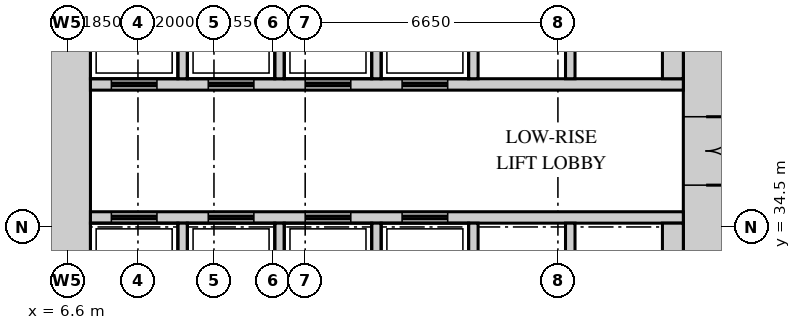
"""IFC4 building model, lengths in metres.
Left out: names, types, materials, properties, quantities, classifications, styles, units other than length and angle.
Written with IfcOpenShell. Run it as: python <this file> out.ifc"""

import sys

from ifc_helpers import new_model, si_unit, direction, frame, frame_2d, origin, place, context, subcontext, project, spatial, rectangle, extrude, source, transform, mapped, element, fill, save


model = new_model("IFC4")
c1 = context("Model", 3, precision=1e-05, world=origin(), true_north=direction((0.0, 1.0)))
c2 = subcontext(c1, "Body", "Model", "MODEL_VIEW")
j1 = project(units=[si_unit("LENGTHUNIT", "METRE"), si_unit("PLANEANGLEUNIT", "RADIAN")], contexts=[c1])
p1 = place(None, origin())
s1 = spatial("IfcSite", under=j1, at=p1, CompositionType="ELEMENT")
p2 = place(p1, origin())
s2 = spatial("IfcBuilding", under=s1, at=p2, CompositionType="ELEMENT")
p3 = place(p2, frame((0.0, 0.0, 7.5)))
s3 = spatial("IfcBuildingStorey", under=s2, at=p3, CompositionType="ELEMENT", Elevation=7.5)
m1 = source(origin(), c2, "Body", "SweptSolid", [
    extrude(rectangle(XDim=27.6, YDim=1.2, at=frame_2d((13.8, 0.0))), origin(), (0.0, 0.0, 1.0), 5.2),
])
p4 = place(p3, frame((23.4, 13.2, 0.0), z_axis=(0.0, 0.0, 1.0), x_axis=(0.0, 1.0, 0.0)))
e1 = element("IfcWall", 1, at=p4, inside=s3, PredefinedType="SHEAR", context=c2, shape_type="MappedRepresentation", body=[
    mapped(m1, transform((0.0, 0.0, 0.0))),
])
m2 = source(origin(), c2, "Body", "SweptSolid", [
    extrude(rectangle(XDim=1.8, YDim=2.1, at=frame_2d((0.9, 1.05))), frame((0.0, 0.61, 0.0), z_axis=(0.0, -1.0, 0.0), x_axis=(1.0, 0.0, 0.0)), (0.0, 0.0, 1.0), 1.22),
])
p5 = place(p4, frame((22.4, 0.0, 0.0)))
e2 = element("IfcOpeningElement", 2, at=p5, cuts=e1, PredefinedType="OPENING", context=c2, shape_type="MappedRepresentation", body=[
    mapped(m2, transform((0.0, 0.0, 0.0))),
])
m3 = source(origin(), c2, "Body", "SweptSolid", [
    extrude(rectangle(XDim=1.2, YDim=2.1, at=frame_2d((0.6, 1.05))), frame((0.0, 0.61, 0.0), z_axis=(0.0, -1.0, 0.0), x_axis=(1.0, 0.0, 0.0)), (0.0, 0.0, 1.0), 1.22),
])
p6 = place(p4, frame((15.15, 0.0, 0.0)))
e3 = element("IfcOpeningElement", 3, at=p6, cuts=e1, PredefinedType="OPENING", context=c2, shape_type="MappedRepresentation", body=[
    mapped(m3, transform((0.0, 0.0, 0.0))),
])
m4 = source(origin(), c2, "Body", "SweptSolid", [
    extrude(rectangle(XDim=0.9, YDim=2.1, at=frame_2d((0.45, 1.05))), frame((0.0, 0.61, 0.0), z_axis=(0.0, -1.0, 0.0), x_axis=(1.0, 0.0, 0.0)), (0.0, 0.0, 1.0), 1.22),
])
p7 = place(p4, frame((1.15, 0.0, 0.0)))
e4 = element("IfcOpeningElement", 4, at=p7, cuts=e1, PredefinedType="OPENING", context=c2, shape_type="MappedRepresentation", body=[
    mapped(m4, transform((0.0, 0.0, 0.0))),
])
p8 = place(p4, frame((4.35, 0.0, 0.0)))
e5 = element("IfcOpeningElement", 5, at=p8, cuts=e1, PredefinedType="OPENING", context=c2, shape_type="MappedRepresentation", body=[
    mapped(m4, transform((0.0, 0.0, 0.0))),
])
p9 = place(p4, frame((7.6, 0.0, 0.0)))
e6 = element("IfcOpeningElement", 6, at=p9, cuts=e1, PredefinedType="OPENING", context=c2, shape_type="MappedRepresentation", body=[
    mapped(m4, transform((0.0, 0.0, 0.0))),
])
p10 = place(p3, frame((6.6, 13.2, 0.0), z_axis=(0.0, 0.0, 1.0), x_axis=(0.0, 1.0, 0.0)))
e7 = element("IfcWall", 7, at=p10, inside=s3, PredefinedType="SHEAR", context=c2, shape_type="MappedRepresentation", body=[
    mapped(m1, transform((0.0, 0.0, 0.0))),
])
m5 = source(origin(), c2, "Body", "SweptSolid", [
    extrude(rectangle(XDim=15.6, YDim=0.3, at=frame_2d((7.8, 0.0))), origin(), (0.0, 0.0, 1.0), 5.2),
])
p11 = place(p3, frame((7.2, 38.25, 0.0), z_axis=(0.0, 0.0, 1.0), x_axis=(1.0, 0.0, 0.0)))
e8 = element("IfcWall", 8, at=p11, inside=s3, PredefinedType="STANDARD", context=c2, shape_type="MappedRepresentation", body=[
    mapped(m5, transform((0.0, 0.0, 0.0))),
])
m6 = source(origin(), c2, "Body", "SweptSolid", [
    extrude(rectangle(XDim=1.2, YDim=2.1, at=frame_2d((0.6, 1.05))), frame((0.0, 0.16, 0.0), z_axis=(0.0, -1.0, 0.0), x_axis=(1.0, 0.0, 0.0)), (0.0, 0.0, 1.0), 0.32),
])
p12 = place(p11, frame((0.55, 0.0, 0.0)))
e9 = element("IfcOpeningElement", 9, at=p12, cuts=e8, PredefinedType="OPENING", context=c2, shape_type="MappedRepresentation", body=[
    mapped(m6, transform((0.0, 0.0, 0.0))),
])
p13 = place(p11, frame((3.1, 0.0, 0.0)))
e10 = element("IfcOpeningElement", 10, at=p13, cuts=e8, PredefinedType="OPENING", context=c2, shape_type="MappedRepresentation", body=[
    mapped(m6, transform((0.0, 0.0, 0.0))),
])
p14 = place(p11, frame((5.65, 0.0, 0.0)))
e11 = element("IfcOpeningElement", 11, at=p14, cuts=e8, PredefinedType="OPENING", context=c2, shape_type="MappedRepresentation", body=[
    mapped(m6, transform((0.0, 0.0, 0.0))),
])
p15 = place(p11, frame((8.2, 0.0, 0.0)))
e12 = element("IfcOpeningElement", 12, at=p15, cuts=e8, PredefinedType="OPENING", context=c2, shape_type="MappedRepresentation", body=[
    mapped(m6, transform((0.0, 0.0, 0.0))),
])
p16 = place(p3, frame((7.2, 34.75, 0.0), z_axis=(0.0, 0.0, 1.0), x_axis=(1.0, 0.0, 0.0)))
e13 = element("IfcWall", 13, at=p16, inside=s3, PredefinedType="STANDARD", context=c2, shape_type="MappedRepresentation", body=[
    mapped(m5, transform((0.0, 0.0, 0.0))),
])
p17 = place(p16, frame((0.55, 0.0, 0.0)))
e14 = element("IfcOpeningElement", 14, at=p17, cuts=e13, PredefinedType="OPENING", context=c2, shape_type="MappedRepresentation", body=[
    mapped(m6, transform((0.0, 0.0, 0.0))),
])
p18 = place(p16, frame((3.1, 0.0, 0.0)))
e15 = element("IfcOpeningElement", 15, at=p18, cuts=e13, PredefinedType="OPENING", context=c2, shape_type="MappedRepresentation", body=[
    mapped(m6, transform((0.0, 0.0, 0.0))),
])
p19 = place(p16, frame((5.65, 0.0, 0.0)))
e16 = element("IfcOpeningElement", 16, at=p19, cuts=e13, PredefinedType="OPENING", context=c2, shape_type="MappedRepresentation", body=[
    mapped(m6, transform((0.0, 0.0, 0.0))),
])
p20 = place(p16, frame((8.2, 0.0, 0.0)))
e17 = element("IfcOpeningElement", 17, at=p20, cuts=e13, PredefinedType="OPENING", context=c2, shape_type="MappedRepresentation", body=[
    mapped(m6, transform((0.0, 0.0, 0.0))),
])
m7 = source(origin(), c2, "Body", "SweptSolid", [
    extrude(rectangle(XDim=2.4, YDim=0.25, at=frame_2d((1.2, 0.0))), origin(), (0.0, 0.0, 1.0), 5.2),
])
for number, where, z_axis, x_axis in (
    (18, (9.625, 38.4, 0.0), (0.0, 0.0, 1.0), (0.0, 1.0, 0.0)),
    (19, (12.175, 38.4, 0.0), (0.0, 0.0, 1.0), (0.0, 1.0, 0.0)),
    (20, (14.725, 38.4, 0.0), (0.0, 0.0, 1.0), (0.0, 1.0, 0.0)),
    (21, (17.275, 38.4, 0.0), (0.0, 0.0, 1.0), (0.0, 1.0, 0.0)),
    (22, (19.825, 38.4, 0.0), (0.0, 0.0, 1.0), (0.0, 1.0, 0.0)),
):
    element("IfcWall", number, at=place(p3, frame(where, z_axis=z_axis, x_axis=x_axis)), inside=s3, PredefinedType="STANDARD", context=c2, shape_type="MappedRepresentation", body=[
        mapped(m7, transform((0.0, 0.0, 0.0))),
    ])
m8 = source(origin(), c2, "Body", "SweptSolid", [
    extrude(rectangle(XDim=2.4, YDim=0.55, at=frame_2d((1.2, 0.0))), origin(), (0.0, 0.0, 1.0), 5.2),
])
p21 = place(p3, frame((22.525, 38.4, 0.0), z_axis=(0.0, 0.0, 1.0), x_axis=(0.0, 1.0, 0.0)))
e23 = element("IfcWall", 23, at=p21, inside=s3, PredefinedType="STANDARD", context=c2, shape_type="MappedRepresentation", body=[
    mapped(m8, transform((0.0, 0.0, 0.0))),
])
for number, where, z_axis, x_axis in (
    (24, (9.625, 32.2, 0.0), (0.0, 0.0, 1.0), (0.0, 1.0, 0.0)),
    (25, (12.175, 32.2, 0.0), (0.0, 0.0, 1.0), (0.0, 1.0, 0.0)),
    (26, (14.725, 32.2, 0.0), (0.0, 0.0, 1.0), (0.0, 1.0, 0.0)),
    (27, (17.275, 32.2, 0.0), (0.0, 0.0, 1.0), (0.0, 1.0, 0.0)),
    (28, (19.825, 32.2, 0.0), (0.0, 0.0, 1.0), (0.0, 1.0, 0.0)),
):
    element("IfcWall", number, at=place(p3, frame(where, z_axis=z_axis, x_axis=x_axis)), inside=s3, PredefinedType="STANDARD", context=c2, shape_type="MappedRepresentation", body=[
        mapped(m7, transform((0.0, 0.0, 0.0))),
    ])
p22 = place(p3, frame((22.525, 32.2, 0.0), z_axis=(0.0, 0.0, 1.0), x_axis=(0.0, 1.0, 0.0)))
e29 = element("IfcWall", 29, at=p22, inside=s3, PredefinedType="STANDARD", context=c2, shape_type="MappedRepresentation", body=[
    mapped(m8, transform((0.0, 0.0, 0.0))),
])
m9 = source(origin(), c2, "Body", "SweptSolid", [
    extrude(rectangle(XDim=1.8, YDim=2.1, at=frame_2d((0.9, 1.05))), frame((0.0, 0.55, 0.0), z_axis=(0.0, -1.0, 0.0), x_axis=(1.0, 0.0, 0.0)), (0.0, 0.0, 1.0), 1.1),
])
p23 = place(p5, origin())
e30 = element("IfcDoor", 30, at=p23, inside=s3, OperationType="DOUBLE_DOOR_SINGLE_SWING", PredefinedType="DOOR", context=c2, shape_type="MappedRepresentation", body=[
    mapped(m9, transform((0.0, 0.0, 0.0))),
])
fill(e2, e30)
m10 = source(origin(), c2, "Body", "SweptSolid", [
    extrude(rectangle(XDim=1.2, YDim=2.1, at=frame_2d((0.6, 1.05))), frame((0.0, 0.025, 0.0), z_axis=(0.0, -1.0, 0.0), x_axis=(1.0, 0.0, 0.0)), (0.0, 0.0, 1.0), 0.05),
])
p24 = place(p17, origin())
e31 = element("IfcDoor", 31, at=p24, inside=s3, OperationType="DOUBLE_DOOR_SLIDING", PredefinedType="DOOR", context=c2, shape_type="MappedRepresentation", body=[
    mapped(m10, transform((0.0, 0.0, 0.0))),
])
fill(e14, e31)
p25 = place(p18, origin())
e32 = element("IfcDoor", 32, at=p25, inside=s3, OperationType="DOUBLE_DOOR_SLIDING", PredefinedType="DOOR", context=c2, shape_type="MappedRepresentation", body=[
    mapped(m10, transform((0.0, 0.0, 0.0))),
])
fill(e15, e32)
p26 = place(p19, origin())
e33 = element("IfcDoor", 33, at=p26, inside=s3, OperationType="DOUBLE_DOOR_SLIDING", PredefinedType="DOOR", context=c2, shape_type="MappedRepresentation", body=[
    mapped(m10, transform((0.0, 0.0, 0.0))),
])
fill(e16, e33)
p27 = place(p20, origin())
e34 = element("IfcDoor", 34, at=p27, inside=s3, OperationType="DOUBLE_DOOR_SLIDING", PredefinedType="DOOR", context=c2, shape_type="MappedRepresentation", body=[
    mapped(m10, transform((0.0, 0.0, 0.0))),
])
fill(e17, e34)
p28 = place(p12, origin())
e35 = element("IfcDoor", 35, at=p28, inside=s3, OperationType="DOUBLE_DOOR_SLIDING", PredefinedType="DOOR", context=c2, shape_type="MappedRepresentation", body=[
    mapped(m10, transform((0.0, 0.0, 0.0))),
])
fill(e9, e35)
p29 = place(p13, origin())
e36 = element("IfcDoor", 36, at=p29, inside=s3, OperationType="DOUBLE_DOOR_SLIDING", PredefinedType="DOOR", context=c2, shape_type="MappedRepresentation", body=[
    mapped(m10, transform((0.0, 0.0, 0.0))),
])
fill(e10, e36)
p30 = place(p14, origin())
e37 = element("IfcDoor", 37, at=p30, inside=s3, OperationType="DOUBLE_DOOR_SLIDING", PredefinedType="DOOR", context=c2, shape_type="MappedRepresentation", body=[
    mapped(m10, transform((0.0, 0.0, 0.0))),
])
fill(e11, e37)
p31 = place(p15, origin())
e38 = element("IfcDoor", 38, at=p31, inside=s3, OperationType="DOUBLE_DOOR_SLIDING", PredefinedType="DOOR", context=c2, shape_type="MappedRepresentation", body=[
    mapped(m10, transform((0.0, 0.0, 0.0))),
])
fill(e12, e38)
save(model, sys.argv[1])
